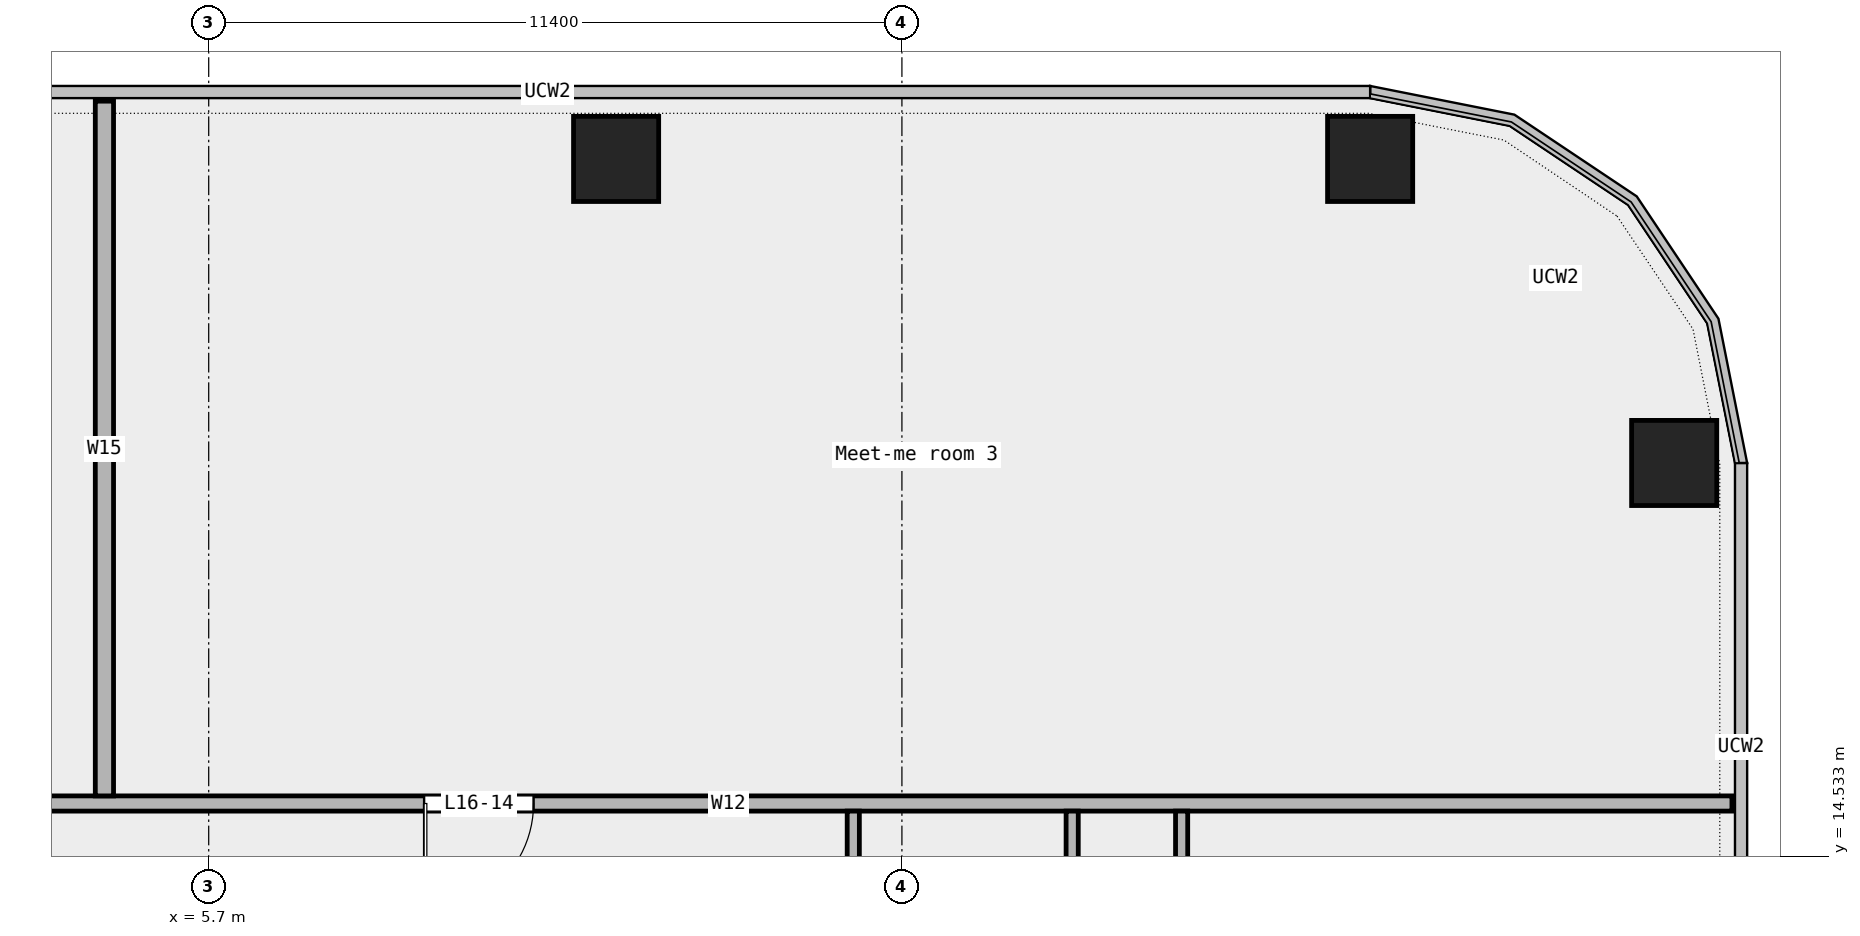
"""IFC4 building model, lengths in metres.
Left out: names, types, materials, properties, quantities, classifications, styles, units other than length and angle.
Written with IfcOpenShell. Run it as: python <this file> out.ifc"""

import sys

from ifc_helpers import new_model, si_unit, direction, frame, frame_2d, origin, origin_2d, place, context, subcontext, project, spatial, rectangle, extrude, element, fill, save


model = new_model("IFC4")
c1 = context("Model", 3, precision=1e-05, world=origin(), true_north=direction((0.0, 1.0)))
c2 = subcontext(c1, "Body", "Model", "MODEL_VIEW")
j1 = project(units=[si_unit("LENGTHUNIT", "METRE"), si_unit("PLANEANGLEUNIT", "RADIAN")], contexts=[c1])
p1 = place(None, origin())
s1 = spatial("IfcSite", under=j1, at=p1, CompositionType="ELEMENT")
p2 = place(p1, origin())
s2 = spatial("IfcBuilding", under=s1, at=p2, CompositionType="ELEMENT")
p3 = place(p2, frame((0.0, 0.0, 83.8)))
s3 = spatial("IfcBuildingStorey", under=s2, at=p3, CompositionType="ELEMENT", Elevation=83.8)
for number, where, z_axis, x_axis in (
    (1, (29.8, 21.0, 0.0), (0.0, 0.0, 1.0), (1.0, 0.0, 0.0)),
    (2, (24.8, 26.0, 0.0), (0.0, 0.0, 1.0), (1.0, 0.0, 0.0)),
    (3, (12.4, 26.0, 0.0), (0.0, 0.0, 1.0), (1.0, 0.0, 0.0)),
):
    element("IfcColumn", number, at=place(p3, frame(where, z_axis=z_axis, x_axis=x_axis)), inside=s3, PredefinedType="COLUMN", context=c2, shape_type="SweptSolid", body=[
        extrude(rectangle(XDim=1.4, YDim=1.4, at=origin_2d()), origin(), (0.0, 0.0, 1.0), 4.2),
    ])
p4 = place(p3, frame((-2.255, 15.4, 0.0), z_axis=(0.0, 0.0, 1.0), x_axis=(1.0, 0.0, 0.0)))
e4 = element("IfcWall", 4, at=p4, inside=s3, PredefinedType="PARTITIONING", context=c2, shape_type="SweptSolid", body=[
    extrude(rectangle(XDim=33.005, YDim=0.25, at=frame_2d((16.502, 0.0))), origin(), (0.0, 0.0, 1.0), 4.2),
])
p5 = place(p4, frame((11.498, 0.0, 0.0)))
e5 = element("IfcOpeningElement", 5, at=p5, cuts=e4, PredefinedType="OPENING", context=c2, shape_type="SweptSolid", body=[
    extrude(rectangle(XDim=1.8, YDim=2.1, at=frame_2d((0.9, 1.05))), frame((0.0, 0.137, 0.0), z_axis=(0.0, -1.0, 0.0), x_axis=(1.0, 0.0, 0.0)), (0.0, 0.0, 1.0), 0.274),
])
p6 = place(p4, frame((2.52, 0.0, 0.0)))
e6 = element("IfcOpeningElement", 6, at=p6, cuts=e4, PredefinedType="OPENING", context=c2, shape_type="SweptSolid", body=[
    extrude(rectangle(XDim=1.2, YDim=2.1, at=frame_2d((0.6, 1.05))), frame((0.0, 0.137, 0.0), z_axis=(0.0, -1.0, 0.0), x_axis=(1.0, 0.0, 0.0)), (0.0, 0.0, 1.0), 0.274),
])
p7 = place(p3, frame((3.985, 15.525, 0.0), z_axis=(0.0, 0.0, 1.0), x_axis=(0.0, 1.0, 0.0)))
e7 = element("IfcWall", 7, at=p7, inside=s3, PredefinedType="PARTITIONING", context=c2, shape_type="SweptSolid", body=[
    extrude(rectangle(XDim=11.425, YDim=0.3, at=frame_2d((5.712, 0.0))), origin(), (0.0, 0.0, 1.0), 4.2),
])
p8 = place(p3, frame((16.3, 11.8, 0.0), z_axis=(0.0, 0.0, 1.0), x_axis=(0.0, 1.0, 0.0)))
e8 = element("IfcWall", 8, at=p8, inside=s3, PredefinedType="PARTITIONING", context=c2, shape_type="SweptSolid", body=[
    extrude(rectangle(XDim=3.475, YDim=0.2, at=frame_2d((1.737, 0.0))), origin(), (0.0, 0.0, 1.0), 4.2),
])
p9 = place(p3, frame((19.9, 7.91, 0.0), z_axis=(0.0, 0.0, 1.0), x_axis=(0.0, 1.0, 0.0)))
e9 = element("IfcWall", 9, at=p9, inside=s3, PredefinedType="PARTITIONING", context=c2, shape_type="SweptSolid", body=[
    extrude(rectangle(XDim=7.365, YDim=0.2, at=frame_2d((3.683, 0.0))), origin(), (0.0, 0.0, 1.0), 4.2),
])
p10 = place(p9, frame((3.232, 0.0, 0.0)))
e10 = element("IfcOpeningElement", 10, at=p10, cuts=e9, PredefinedType="OPENING", context=c2, shape_type="SweptSolid", body=[
    extrude(rectangle(XDim=0.9, YDim=2.1, at=frame_2d((0.45, 1.05))), frame((0.0, 0.112, 0.0), z_axis=(0.0, -1.0, 0.0), x_axis=(1.0, 0.0, 0.0)), (0.0, 0.0, 1.0), 0.224),
])
p11 = place(p3, frame((21.7, -2.21, 0.0), z_axis=(0.0, 0.0, 1.0), x_axis=(0.0, 1.0, 0.0)))
e11 = element("IfcWall", 11, at=p11, inside=s3, PredefinedType="PARTITIONING", context=c2, shape_type="SweptSolid", body=[
    extrude(rectangle(XDim=17.485, YDim=0.2, at=frame_2d((8.742, 0.0))), origin(), (0.0, 0.0, 1.0), 4.2),
])
p12 = place(p11, frame((15.23, 0.0, 0.0)))
e12 = element("IfcOpeningElement", 12, at=p12, cuts=e11, PredefinedType="OPENING", context=c2, shape_type="SweptSolid", body=[
    extrude(rectangle(XDim=0.9, YDim=2.1, at=frame_2d((0.45, 1.05))), frame((0.0, 0.112, 0.0), z_axis=(0.0, -1.0, 0.0), x_axis=(1.0, 0.0, 0.0)), (0.0, 0.0, 1.0), 0.224),
])
p13 = place(p11, frame((6.188, 0.0, 0.0)))
e13 = element("IfcOpeningElement", 13, at=p13, cuts=e11, PredefinedType="OPENING", context=c2, shape_type="SweptSolid", body=[
    extrude(rectangle(XDim=1.5, YDim=2.1, at=frame_2d((0.75, 1.05))), frame((0.0, 0.112, 0.0), z_axis=(0.0, -1.0, 0.0), x_axis=(1.0, 0.0, 0.0)), (0.0, 0.0, 1.0), 0.224),
])
p14 = place(p5, origin())
e14 = element("IfcDoor", 14, at=p14, inside=s3, OperationType="DOUBLE_DOOR_SINGLE_SWING", PredefinedType="DOOR", context=c2, shape_type="SweptSolid", body=[
    extrude(rectangle(XDim=1.8, YDim=2.1, at=frame_2d((0.9, 1.05))), frame((0.0, 0.025, 0.0), z_axis=(0.0, -1.0, 0.0), x_axis=(1.0, 0.0, 0.0)), (0.0, 0.0, 1.0), 0.05),
])
fill(e5, e14)
save(model, sys.argv[1])
